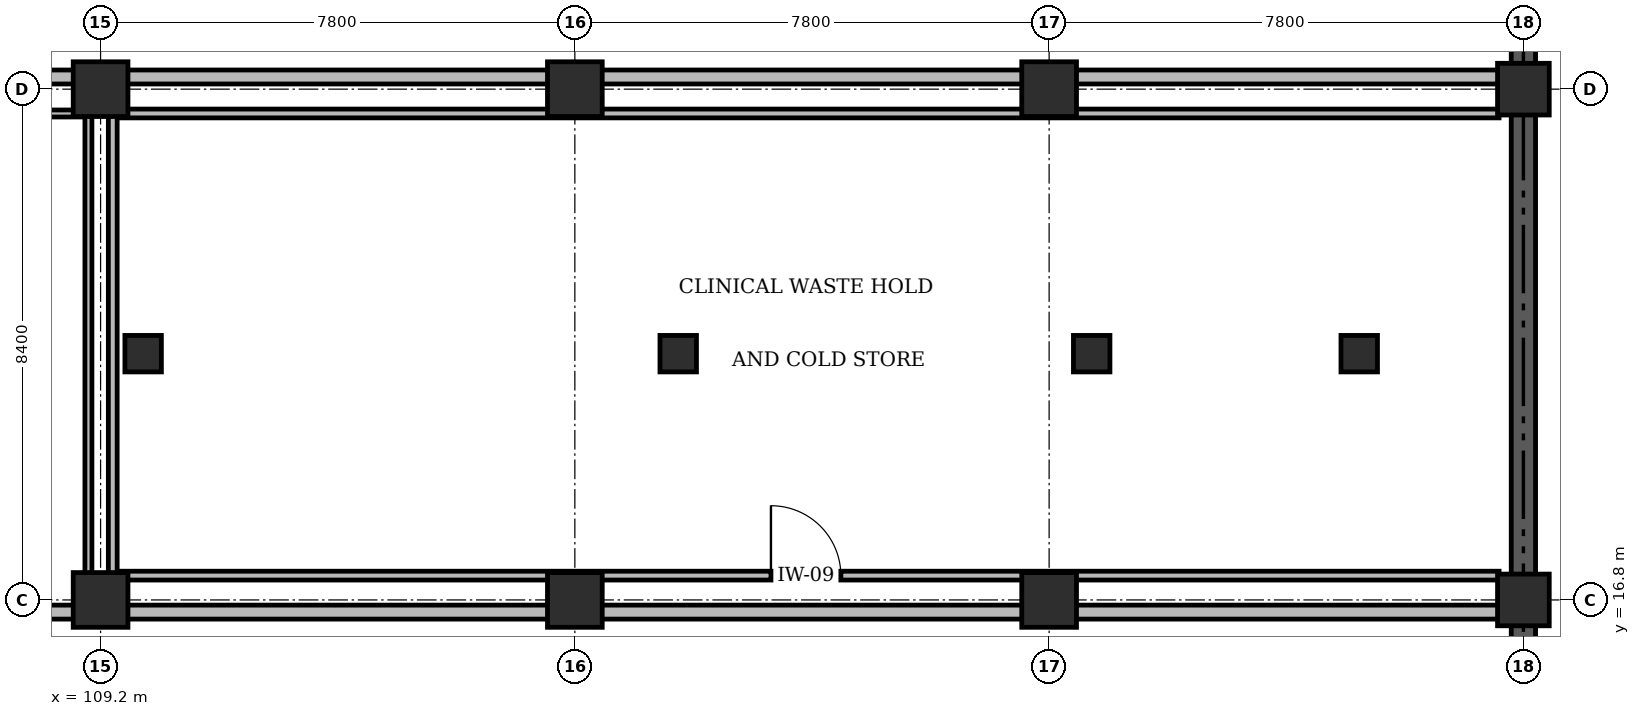
"""IFC4 building model, lengths in metres.
Left out: names, types, materials, properties, quantities, classifications, styles, units other than length and angle.
Written with IfcOpenShell. Run it as: python <this file> out.ifc"""

import sys

from ifc_helpers import new_model, si_unit, direction, frame, frame_2d, origin, origin_2d, place, context, subcontext, project, spatial, rectangle, circle, extrude, element, fill, save


model = new_model("IFC4")
c1 = context("Model", 3, precision=1e-05, world=origin(), true_north=direction((0.0, 1.0)))
c2 = subcontext(c1, "Body", "Model", "MODEL_VIEW")
j1 = project(units=[si_unit("LENGTHUNIT", "METRE"), si_unit("PLANEANGLEUNIT", "RADIAN")], contexts=[c1])
p1 = place(None, origin())
s1 = spatial("IfcSite", under=j1, at=p1, CompositionType="ELEMENT")
p2 = place(p1, origin())
s2 = spatial("IfcBuilding", under=s1, at=p2, CompositionType="ELEMENT")
p3 = place(p2, frame((0.0, 0.0, -4.8)))
s3 = spatial("IfcBuildingStorey", under=s2, at=p3, CompositionType="ELEMENT", Elevation=-4.8)
p4 = place(p3, frame((132.6, 0.0, 0.0), z_axis=(0.0, 0.0, 1.0), x_axis=(0.0, 1.0, 0.0)))
e1 = element("IfcWall", 1, at=p4, inside=s3, PredefinedType="SOLIDWALL", context=c2, shape_type="SweptSolid", body=[
    extrude(rectangle(XDim=42.0, YDim=0.4, at=frame_2d((21.0, 0.0))), origin(), (0.0, 0.0, 1.0), 4.8),
])
for number, where, z_axis, x_axis in (
    (2, (109.2, 16.8, 0.0), (0.0, 0.0, 1.0), (1.0, 0.0, 0.0)),
    (3, (109.2, 25.2, 0.0), (0.0, 0.0, 1.0), (1.0, 0.0, 0.0)),
    (4, (117.0, 16.8, 0.0), (0.0, 0.0, 1.0), (1.0, 0.0, 0.0)),
    (5, (117.0, 25.2, 0.0), (0.0, 0.0, 1.0), (1.0, 0.0, 0.0)),
    (6, (124.8, 16.8, 0.0), (0.0, 0.0, 1.0), (1.0, 0.0, 0.0)),
    (7, (124.8, 25.2, 0.0), (0.0, 0.0, 1.0), (1.0, 0.0, 0.0)),
):
    element("IfcColumn", number, at=place(p3, frame(where, z_axis=z_axis, x_axis=x_axis)), inside=s3, PredefinedType="COLUMN", context=c2, shape_type="SweptSolid", body=[
        extrude(rectangle(XDim=0.9, YDim=0.9, at=origin_2d()), origin(), (0.0, 0.0, 1.0), 4.8),
    ])
for number, where, z_axis, x_axis in (
    (8, (132.6, 16.8, 0.0), (0.0, 0.0, 1.0), (1.0, 0.0, 0.0)),
    (9, (132.6, 25.2, 0.0), (0.0, 0.0, 1.0), (1.0, 0.0, 0.0)),
):
    element("IfcColumn", number, at=place(p3, frame(where, z_axis=z_axis, x_axis=x_axis)), inside=s3, PredefinedType="COLUMN", context=c2, shape_type="SweptSolid", body=[
        extrude(rectangle(XDim=0.85, YDim=0.85, at=origin_2d()), origin(), (0.0, 0.0, 1.0), 4.8),
    ])
for number, where, z_axis, x_axis in (
    (10, (129.9, 20.85, -0.4), (0.0, 0.0, 1.0), (1.0, 0.0, 0.0)),
    (11, (125.5, 20.85, -0.4), (0.0, 0.0, 1.0), (1.0, 0.0, 0.0)),
    (12, (118.7, 20.85, -0.4), (0.0, 0.0, 1.0), (1.0, 0.0, 0.0)),
    (13, (109.9, 20.85, -0.4), (0.0, 0.0, 1.0), (1.0, 0.0, 0.0)),
):
    element("IfcColumn", number, at=place(p3, frame(where, z_axis=z_axis, x_axis=x_axis)), inside=s3, PredefinedType="PILASTER", context=c2, shape_type="SweptSolid", body=[
        extrude(circle(Radius=0.3, at=origin_2d()), origin(), (0.0, 0.0, 1.0), 5.2),
    ])
p5 = place(p3, frame((78.2, 24.8, 0.0), z_axis=(0.0, 0.0, 1.0), x_axis=(1.0, 0.0, 0.0)))
e14 = element("IfcWall", 14, at=p5, inside=s3, PredefinedType="PARTITIONING", context=c2, shape_type="SweptSolid", body=[
    extrude(rectangle(XDim=30.8, YDim=0.115, at=frame_2d((15.4, 0.0))), origin(), (0.0, 0.0, 1.0), 3.53),
])
p6 = place(p3, frame((109.0, 17.2, 0.0), z_axis=(0.0, 0.0, 1.0), x_axis=(0.0, 1.0, 0.0)))
e15 = element("IfcWall", 15, at=p6, inside=s3, PredefinedType="PARTITIONING", context=c2, shape_type="SweptSolid", body=[
    extrude(rectangle(XDim=7.6, YDim=0.115, at=frame_2d((3.8, 0.0))), origin(), (0.0, 0.0, 1.0), 3.515),
])
p7 = place(p3, frame((109.4, 17.2, 0.0), z_axis=(0.0, 0.0, 1.0), x_axis=(1.0, 0.0, 0.0)))
e16 = element("IfcWall", 16, at=p7, inside=s3, PredefinedType="PARTITIONING", context=c2, shape_type="SweptSolid", body=[
    extrude(rectangle(XDim=22.8, YDim=0.145, at=frame_2d((11.4, 0.0))), origin(), (0.0, 0.0, 1.0), 3.53),
])
p8 = place(p7, frame((10.825, 0.0, 0.0)))
e17 = element("IfcOpeningElement", 17, at=p8, cuts=e16, PredefinedType="OPENING", context=c2, shape_type="SweptSolid", body=[
    extrude(rectangle(XDim=1.15, YDim=2.15, at=frame_2d((0.575, 1.075))), frame((0.0, 0.083, 0.0), z_axis=(0.0, -1.0, 0.0), x_axis=(1.0, 0.0, 0.0)), (0.0, 0.0, 1.0), 0.165),
])
p9 = place(p3, frame((109.4, 24.8, 0.0), z_axis=(0.0, 0.0, 1.0), x_axis=(1.0, 0.0, 0.0)))
e18 = element("IfcWall", 18, at=p9, inside=s3, PredefinedType="PARTITIONING", context=c2, shape_type="SweptSolid", body=[
    extrude(rectangle(XDim=22.8, YDim=0.145, at=frame_2d((11.4, 0.0))), origin(), (0.0, 0.0, 1.0), 3.53),
])
p10 = place(p3, frame((109.4, 17.2, 0.0), z_axis=(0.0, 0.0, 1.0), x_axis=(0.0, 1.0, 0.0)))
e19 = element("IfcWall", 19, at=p10, inside=s3, PredefinedType="PARTITIONING", context=c2, shape_type="SweptSolid", body=[
    extrude(rectangle(XDim=7.6, YDim=0.145, at=frame_2d((3.8, 0.0))), origin(), (0.0, 0.0, 1.0), 3.515),
])
p11 = place(p3, frame((101.96, 16.6, 0.0), z_axis=(0.0, 0.0, 1.0), x_axis=(1.0, 0.0, 0.0)))
e20 = element("IfcWall", 20, at=p11, inside=s3, PredefinedType="STANDARD", context=c2, shape_type="SweptSolid", body=[
    extrude(rectangle(XDim=30.24, YDim=0.23, at=frame_2d((15.12, 0.0))), origin(), (0.0, 0.0, 1.0), 3.53),
])
p12 = place(p3, frame((74.0, 25.4, 0.0), z_axis=(0.0, 0.0, 1.0), x_axis=(1.0, 0.0, 0.0)))
e21 = element("IfcWall", 21, at=p12, inside=s3, PredefinedType="STANDARD", context=c2, shape_type="SweptSolid", body=[
    extrude(rectangle(XDim=58.2, YDim=0.23, at=frame_2d((29.1, 0.0))), origin(), (0.0, 0.0, 1.0), 3.53),
])
p13 = place(p8, origin())
e22 = element("IfcDoor", 22, at=p13, inside=s3, OperationType="SINGLE_SWING_LEFT", PredefinedType="DOOR", context=c2, shape_type="SweptSolid", body=[
    extrude(rectangle(XDim=1.15, YDim=2.15, at=frame_2d((0.575, 1.075))), frame((0.0, 0.025, 0.0), z_axis=(0.0, -1.0, 0.0), x_axis=(1.0, 0.0, 0.0)), (0.0, 0.0, 1.0), 0.05),
])
fill(e17, e22)
save(model, sys.argv[1])
